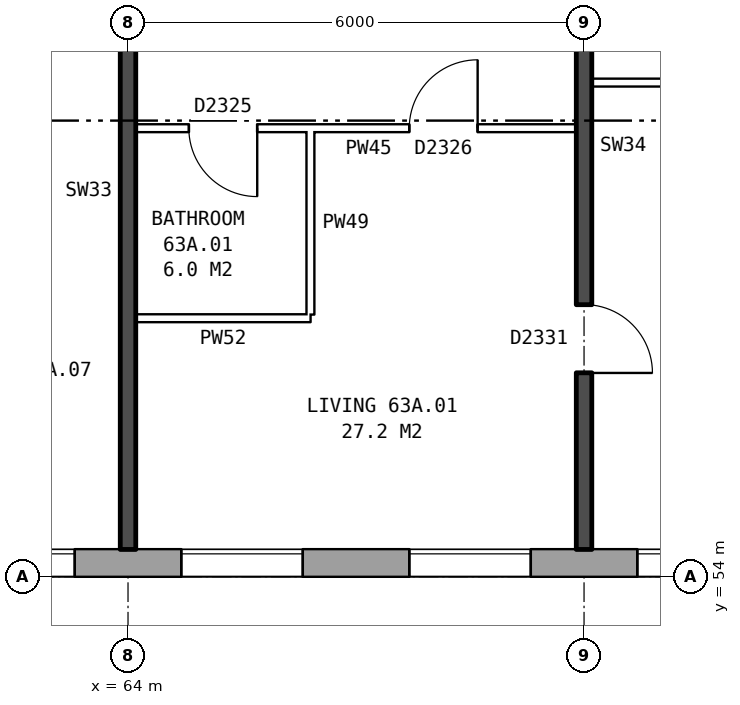
"""IFC4 building model, lengths in metres.
Left out: names, types, materials, properties, quantities, classifications, styles, units other than length and angle.
Written with IfcOpenShell. Run it as: python <this file> out.ifc"""

import sys

from ifc_helpers import new_model, si_unit, direction, frame, frame_2d, origin, place, context, subcontext, project, spatial, rectangle, extrude, element, fill, save


model = new_model("IFC4")
c1 = context("Model", 3, precision=1e-05, world=origin(), true_north=direction((0.0, 1.0)))
c2 = subcontext(c1, "Body", "Model", "MODEL_VIEW")
j1 = project(units=[si_unit("LENGTHUNIT", "METRE"), si_unit("PLANEANGLEUNIT", "RADIAN")], contexts=[c1])
p1 = place(None, origin())
s1 = spatial("IfcSite", under=j1, at=p1, CompositionType="ELEMENT")
p2 = place(p1, origin())
s2 = spatial("IfcBuilding", under=s1, at=p2, CompositionType="ELEMENT")
p3 = place(p2, frame((0.0, 0.0, 224.5)))
s3 = spatial("IfcBuildingStorey", under=s2, at=p3, CompositionType="ELEMENT", Elevation=224.5)
p4 = place(p3, frame((35.075, 54.18, 0.0), z_axis=(0.0, 0.0, 1.0), x_axis=(1.0, 0.0, 0.0)))
e1 = element("IfcWall", 1, at=p4, inside=s3, PredefinedType="STANDARD", context=c2, shape_type="SweptSolid", body=[
    extrude(rectangle(XDim=39.875, YDim=0.36, at=frame_2d((19.938, 0.0))), origin(), (0.0, 0.0, 1.0), 2.85),
])
p5 = place(p4, frame((2.625, 0.0, 0.8)))
e2 = element("IfcOpeningElement", 2, at=p5, cuts=e1, PredefinedType="OPENING", context=c2, shape_type="SweptSolid", body=[
    extrude(rectangle(XDim=1.6, YDim=1.8, at=frame_2d((0.8, 0.9))), frame((0.0, 0.19, 0.0), z_axis=(0.0, -1.0, 0.0), x_axis=(1.0, 0.0, 0.0)), (0.0, 0.0, 1.0), 0.38),
])
p6 = place(p4, frame((5.625, 0.0, 0.8)))
e3 = element("IfcOpeningElement", 3, at=p6, cuts=e1, PredefinedType="OPENING", context=c2, shape_type="SweptSolid", body=[
    extrude(rectangle(XDim=1.6, YDim=1.8, at=frame_2d((0.8, 0.9))), frame((0.0, 0.19, 0.0), z_axis=(0.0, -1.0, 0.0), x_axis=(1.0, 0.0, 0.0)), (0.0, 0.0, 1.0), 0.38),
])
p7 = place(p4, frame((8.625, 0.0, 0.8)))
e4 = element("IfcOpeningElement", 4, at=p7, cuts=e1, PredefinedType="OPENING", context=c2, shape_type="SweptSolid", body=[
    extrude(rectangle(XDim=1.6, YDim=1.8, at=frame_2d((0.8, 0.9))), frame((0.0, 0.19, 0.0), z_axis=(0.0, -1.0, 0.0), x_axis=(1.0, 0.0, 0.0)), (0.0, 0.0, 1.0), 0.38),
])
p8 = place(p4, frame((11.125, 0.0, 1.65)))
e5 = element("IfcOpeningElement", 5, at=p8, cuts=e1, PredefinedType="OPENING", context=c2, shape_type="SweptSolid", body=[
    extrude(rectangle(XDim=0.6, YDim=0.9, at=frame_2d((0.3, 0.45))), frame((0.0, 0.19, 0.0), z_axis=(0.0, -1.0, 0.0), x_axis=(1.0, 0.0, 0.0)), (0.0, 0.0, 1.0), 0.38),
])
p9 = place(p4, frame((14.625, 0.0, 0.8)))
e6 = element("IfcOpeningElement", 6, at=p9, cuts=e1, PredefinedType="OPENING", context=c2, shape_type="SweptSolid", body=[
    extrude(rectangle(XDim=1.6, YDim=1.8, at=frame_2d((0.8, 0.9))), frame((0.0, 0.19, 0.0), z_axis=(0.0, -1.0, 0.0), x_axis=(1.0, 0.0, 0.0)), (0.0, 0.0, 1.0), 0.38),
])
p10 = place(p4, frame((17.625, 0.0, 0.8)))
e7 = element("IfcOpeningElement", 7, at=p10, cuts=e1, PredefinedType="OPENING", context=c2, shape_type="SweptSolid", body=[
    extrude(rectangle(XDim=1.6, YDim=1.8, at=frame_2d((0.8, 0.9))), frame((0.0, 0.19, 0.0), z_axis=(0.0, -1.0, 0.0), x_axis=(1.0, 0.0, 0.0)), (0.0, 0.0, 1.0), 0.38),
])
p11 = place(p4, frame((20.625, 0.0, 0.8)))
e8 = element("IfcOpeningElement", 8, at=p11, cuts=e1, PredefinedType="OPENING", context=c2, shape_type="SweptSolid", body=[
    extrude(rectangle(XDim=1.6, YDim=1.8, at=frame_2d((0.8, 0.9))), frame((0.0, 0.19, 0.0), z_axis=(0.0, -1.0, 0.0), x_axis=(1.0, 0.0, 0.0)), (0.0, 0.0, 1.0), 0.38),
])
p12 = place(p4, frame((23.125, 0.0, 0.75)))
e9 = element("IfcOpeningElement", 9, at=p12, cuts=e1, PredefinedType="OPENING", context=c2, shape_type="SweptSolid", body=[
    extrude(rectangle(XDim=1.2, YDim=1.8, at=frame_2d((0.6, 0.9))), frame((0.0, 0.19, 0.0), z_axis=(0.0, -1.0, 0.0), x_axis=(1.0, 0.0, 0.0)), (0.0, 0.0, 1.0), 0.38),
])
p13 = place(p4, frame((26.625, 0.0, 0.8)))
e10 = element("IfcOpeningElement", 10, at=p13, cuts=e1, PredefinedType="OPENING", context=c2, shape_type="SweptSolid", body=[
    extrude(rectangle(XDim=1.6, YDim=1.8, at=frame_2d((0.8, 0.9))), frame((0.0, 0.19, 0.0), z_axis=(0.0, -1.0, 0.0), x_axis=(1.0, 0.0, 0.0)), (0.0, 0.0, 1.0), 0.38),
])
p14 = place(p4, frame((29.625, 0.0, 0.8)))
e11 = element("IfcOpeningElement", 11, at=p14, cuts=e1, PredefinedType="OPENING", context=c2, shape_type="SweptSolid", body=[
    extrude(rectangle(XDim=1.6, YDim=1.8, at=frame_2d((0.8, 0.9))), frame((0.0, 0.19, 0.0), z_axis=(0.0, -1.0, 0.0), x_axis=(1.0, 0.0, 0.0)), (0.0, 0.0, 1.0), 0.38),
])
p15 = place(p4, frame((32.625, 0.0, 0.8)))
e12 = element("IfcOpeningElement", 12, at=p15, cuts=e1, PredefinedType="OPENING", context=c2, shape_type="SweptSolid", body=[
    extrude(rectangle(XDim=1.6, YDim=1.8, at=frame_2d((0.8, 0.9))), frame((0.0, 0.19, 0.0), z_axis=(0.0, -1.0, 0.0), x_axis=(1.0, 0.0, 0.0)), (0.0, 0.0, 1.0), 0.38),
])
p16 = place(p4, frame((35.625, 0.0, 0.8)))
e13 = element("IfcOpeningElement", 13, at=p16, cuts=e1, PredefinedType="OPENING", context=c2, shape_type="SweptSolid", body=[
    extrude(rectangle(XDim=1.6, YDim=1.8, at=frame_2d((0.8, 0.9))), frame((0.0, 0.19, 0.0), z_axis=(0.0, -1.0, 0.0), x_axis=(1.0, 0.0, 0.0)), (0.0, 0.0, 1.0), 0.38),
])
p17 = place(p4, frame((12.925, 0.0, 0.15)))
e14 = element("IfcOpeningElement", 14, at=p17, cuts=e1, PredefinedType="OPENING", context=c2, shape_type="SweptSolid", body=[
    extrude(rectangle(XDim=0.8, YDim=1.5, at=frame_2d((0.4, 0.75))), frame((0.0, 0.19, 0.0), z_axis=(0.0, -1.0, 0.0), x_axis=(1.0, 0.0, 0.0)), (0.0, 0.0, 1.0), 0.38),
])
p18 = place(p4, frame((24.625, 0.0, 0.25)))
e15 = element("IfcOpeningElement", 15, at=p18, cuts=e1, PredefinedType="OPENING", context=c2, shape_type="SweptSolid", body=[
    extrude(rectangle(XDim=0.6, YDim=0.9, at=frame_2d((0.3, 0.45))), frame((0.0, 0.19, 0.0), z_axis=(0.0, -1.0, 0.0), x_axis=(1.0, 0.0, 0.0)), (0.0, 0.0, 1.0), 0.38),
])
p19 = place(p3, frame((64.1, 57.4, 0.0), z_axis=(0.0, 0.0, 1.0), x_axis=(1.0, 0.0, 0.0)))
e16 = element("IfcWall", 16, at=p19, inside=s3, PredefinedType="PARTITIONING", context=c2, shape_type="SweptSolid", body=[
    extrude(rectangle(XDim=2.3, YDim=0.1, at=frame_2d((1.15, 0.0))), origin(), (0.0, 0.0, 1.0), 2.85),
])
p20 = place(p3, frame((64.1, 59.9, 0.0), z_axis=(0.0, 0.0, 1.0), x_axis=(1.0, 0.0, 0.0)))
e17 = element("IfcWall", 17, at=p20, inside=s3, PredefinedType="PARTITIONING", context=c2, shape_type="SweptSolid", body=[
    extrude(rectangle(XDim=5.8, YDim=0.1, at=frame_2d((2.9, 0.0))), origin(), (0.0, 0.0, 1.0), 2.85),
])
p21 = place(p20, frame((3.6, 0.0, 0.0)))
e18 = element("IfcOpeningElement", 18, at=p21, cuts=e17, PredefinedType="OPENING", context=c2, shape_type="SweptSolid", body=[
    extrude(rectangle(XDim=0.9, YDim=2.1, at=frame_2d((0.45, 1.05))), frame((0.0, 0.06, 0.0), z_axis=(0.0, -1.0, 0.0), x_axis=(1.0, 0.0, 0.0)), (0.0, 0.0, 1.0), 0.12),
])
p22 = place(p20, frame((0.7, 0.0, 0.0)))
e19 = element("IfcOpeningElement", 19, at=p22, cuts=e17, PredefinedType="OPENING", context=c2, shape_type="SweptSolid", body=[
    extrude(rectangle(XDim=0.9, YDim=2.1, at=frame_2d((0.45, 1.05))), frame((0.0, 0.06, 0.0), z_axis=(0.0, -1.0, 0.0), x_axis=(1.0, 0.0, 0.0)), (0.0, 0.0, 1.0), 0.12),
])
p23 = place(p3, frame((70.1, 60.5, 0.0), z_axis=(0.0, 0.0, 1.0), x_axis=(1.0, 0.0, 0.0)))
e20 = element("IfcWall", 20, at=p23, inside=s3, PredefinedType="PARTITIONING", context=c2, shape_type="SweptSolid", body=[
    extrude(rectangle(XDim=5.8, YDim=0.1, at=frame_2d((2.9, 0.0))), origin(), (0.0, 0.0, 1.0), 2.85),
])
p24 = place(p3, frame((64.0, 54.36, 0.0), z_axis=(0.0, 0.0, 1.0), x_axis=(0.0, 1.0, 0.0)))
e21 = element("IfcWall", 21, at=p24, inside=s3, PredefinedType="SOLIDWALL", context=c2, shape_type="SweptSolid", body=[
    extrude(rectangle(XDim=9.44, YDim=0.2, at=frame_2d((4.72, 0.0))), origin(), (0.0, 0.0, 1.0), 2.85),
])
p25 = place(p3, frame((66.4, 57.45, 0.0), z_axis=(0.0, 0.0, 1.0), x_axis=(0.0, 1.0, 0.0)))
e22 = element("IfcWall", 22, at=p25, inside=s3, PredefinedType="PARTITIONING", context=c2, shape_type="SweptSolid", body=[
    extrude(rectangle(XDim=2.4, YDim=0.1, at=frame_2d((1.2, 0.0))), origin(), (0.0, 0.0, 1.0), 2.85),
])
p26 = place(p3, frame((70.0, 54.36, 0.0), z_axis=(0.0, 0.0, 1.0), x_axis=(0.0, 1.0, 0.0)))
e23 = element("IfcWall", 23, at=p26, inside=s3, PredefinedType="SOLIDWALL", context=c2, shape_type="SweptSolid", body=[
    extrude(rectangle(XDim=9.44, YDim=0.2, at=frame_2d((4.72, 0.0))), origin(), (0.0, 0.0, 1.0), 2.85),
])
p27 = place(p26, frame((2.32, 0.0, 0.0)))
e24 = element("IfcOpeningElement", 24, at=p27, cuts=e23, PredefinedType="OPENING", context=c2, shape_type="SweptSolid", body=[
    extrude(rectangle(XDim=0.9, YDim=2.1, at=frame_2d((0.45, 1.05))), frame((0.0, 0.11, 0.0), z_axis=(0.0, -1.0, 0.0), x_axis=(1.0, 0.0, 0.0)), (0.0, 0.0, 1.0), 0.22),
])
p28 = place(p26, frame((7.39, 0.0, 0.0)))
e25 = element("IfcOpeningElement", 25, at=p28, cuts=e23, PredefinedType="OPENING", context=c2, shape_type="SweptSolid", body=[
    extrude(rectangle(XDim=0.8, YDim=2.1, at=frame_2d((0.4, 1.05))), frame((0.0, 0.11, 0.0), z_axis=(0.0, -1.0, 0.0), x_axis=(1.0, 0.0, 0.0)), (0.0, 0.0, 1.0), 0.22),
])
p29 = place(p13, origin())
e26 = element("IfcWindow", 26, at=p29, inside=s3, PartitioningType="SINGLE_PANEL", PredefinedType="WINDOW", context=c2, shape_type="SweptSolid", body=[
    extrude(rectangle(XDim=1.6, YDim=1.8, at=frame_2d((0.8, 0.9))), frame((0.0, 0.15, 0.0), z_axis=(0.0, -1.0, 0.0), x_axis=(1.0, 0.0, 0.0)), (0.0, 0.0, 1.0), 0.06),
])
fill(e10, e26)
p30 = place(p14, origin())
e27 = element("IfcWindow", 27, at=p30, inside=s3, PartitioningType="SINGLE_PANEL", PredefinedType="WINDOW", context=c2, shape_type="SweptSolid", body=[
    extrude(rectangle(XDim=1.6, YDim=1.8, at=frame_2d((0.8, 0.9))), frame((0.0, 0.15, 0.0), z_axis=(0.0, -1.0, 0.0), x_axis=(1.0, 0.0, 0.0)), (0.0, 0.0, 1.0), 0.06),
])
fill(e11, e27)
p31 = place(p15, origin())
e28 = element("IfcWindow", 28, at=p31, inside=s3, PartitioningType="SINGLE_PANEL", PredefinedType="WINDOW", context=c2, shape_type="SweptSolid", body=[
    extrude(rectangle(XDim=1.6, YDim=1.8, at=frame_2d((0.8, 0.9))), frame((0.0, 0.15, 0.0), z_axis=(0.0, -1.0, 0.0), x_axis=(1.0, 0.0, 0.0)), (0.0, 0.0, 1.0), 0.06),
])
fill(e12, e28)
p32 = place(p16, origin())
e29 = element("IfcWindow", 29, at=p32, inside=s3, PartitioningType="SINGLE_PANEL", PredefinedType="WINDOW", context=c2, shape_type="SweptSolid", body=[
    extrude(rectangle(XDim=1.6, YDim=1.8, at=frame_2d((0.8, 0.9))), frame((0.0, 0.15, 0.0), z_axis=(0.0, -1.0, 0.0), x_axis=(1.0, 0.0, 0.0)), (0.0, 0.0, 1.0), 0.06),
])
fill(e13, e29)
p33 = place(p27, frame((0.9, 0.0, 0.0), z_axis=(0.0, 0.0, 1.0), x_axis=(-1.0, 0.0, 0.0)))
e30 = element("IfcDoor", 30, at=p33, inside=s3, OperationType="SINGLE_SWING_RIGHT", PredefinedType="DOOR", context=c2, shape_type="SweptSolid", body=[
    extrude(rectangle(XDim=0.9, YDim=2.1, at=frame_2d((0.45, 1.05))), frame((0.0, 0.025, 0.0), z_axis=(0.0, -1.0, 0.0), x_axis=(1.0, 0.0, 0.0)), (0.0, 0.0, 1.0), 0.05),
])
fill(e24, e30)
p34 = place(p21, origin())
e31 = element("IfcDoor", 31, at=p34, inside=s3, OperationType="SINGLE_SWING_RIGHT", PredefinedType="DOOR", context=c2, shape_type="SweptSolid", body=[
    extrude(rectangle(XDim=0.9, YDim=2.1, at=frame_2d((0.45, 1.05))), frame((0.0, 0.025, 0.0), z_axis=(0.0, -1.0, 0.0), x_axis=(1.0, 0.0, 0.0)), (0.0, 0.0, 1.0), 0.05),
])
fill(e18, e31)
p35 = place(p22, frame((0.9, 0.0, 0.0), z_axis=(0.0, 0.0, 1.0), x_axis=(-1.0, 0.0, 0.0)))
e32 = element("IfcDoor", 32, at=p35, inside=s3, OperationType="SINGLE_SWING_LEFT", PredefinedType="DOOR", context=c2, shape_type="SweptSolid", body=[
    extrude(rectangle(XDim=0.9, YDim=2.1, at=frame_2d((0.45, 1.05))), frame((0.0, 0.025, 0.0), z_axis=(0.0, -1.0, 0.0), x_axis=(1.0, 0.0, 0.0)), (0.0, 0.0, 1.0), 0.05),
])
fill(e19, e32)
save(model, sys.argv[1])
